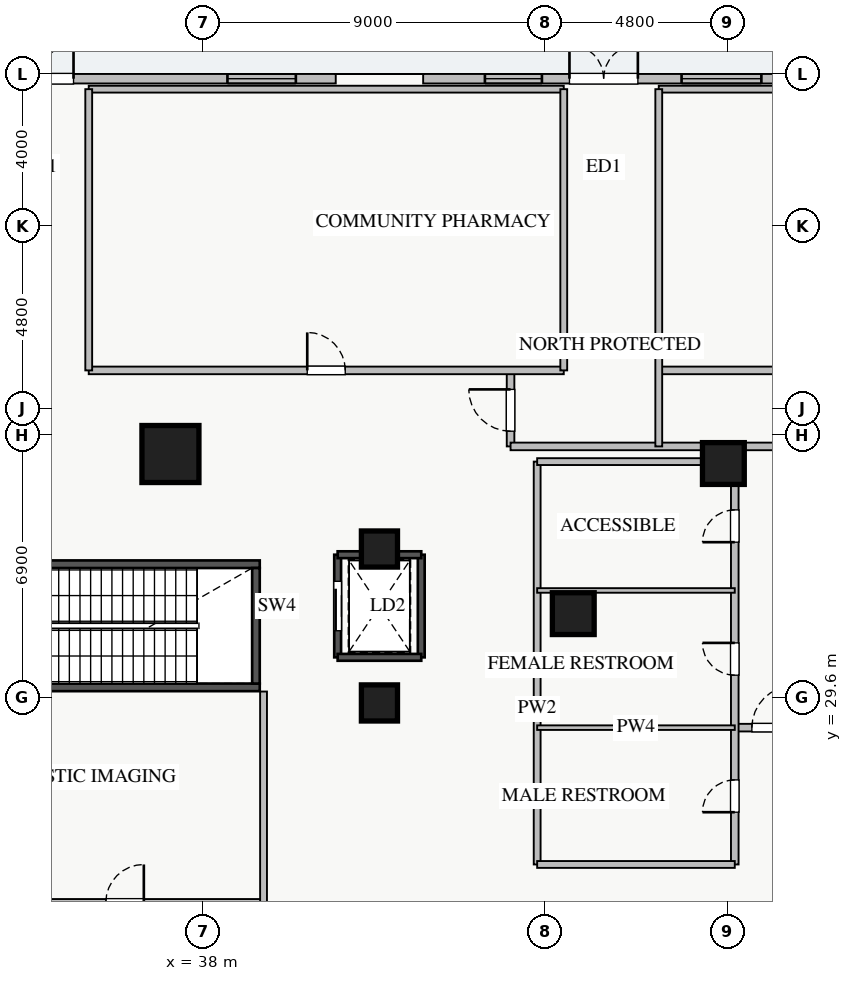
"""IFC4 building model, lengths in metres.
Left out: names, types, materials, properties, quantities, classifications, styles, units other than length and angle.
Written with IfcOpenShell. Run it as: python <this file> out.ifc"""

import sys

from ifc_helpers import new_model, si_unit, direction, frame, frame_2d, origin, origin_2d, place, context, subcontext, project, spatial, rectangle, extrude, source, transform, mapped, element, fill, save


model = new_model("IFC4")
c1 = context("Model", 3, precision=1e-05, world=origin(), true_north=direction((0.0, 1.0)))
c2 = subcontext(c1, "Body", "Model", "MODEL_VIEW")
j1 = project(units=[si_unit("LENGTHUNIT", "METRE"), si_unit("PLANEANGLEUNIT", "RADIAN")], contexts=[c1])
p1 = place(None, origin())
s1 = spatial("IfcSite", under=j1, at=p1, CompositionType="ELEMENT")
p2 = place(p1, origin())
s2 = spatial("IfcBuilding", under=s1, at=p2, CompositionType="ELEMENT")
p3 = place(p2, origin())
s3 = spatial("IfcBuildingStorey", under=s2, at=p3, CompositionType="ELEMENT", Elevation=0.0)
p4 = place(p3, frame((41.55, 30.65, 0.0), z_axis=(0.0, 0.0, 1.0), x_axis=(0.0, 1.0, 0.0)))
e1 = element("IfcWall", 1, at=p4, inside=s3, PredefinedType="SHEAR", context=c2, shape_type="SweptSolid", body=[
    extrude(rectangle(XDim=2.7, YDim=0.18, at=frame_2d((1.35, 0.0))), origin(), (0.0, 0.0, 1.0), 4.78),
])
p5 = place(p4, frame((0.7, 0.0, 0.0)))
e2 = element("IfcOpeningElement", 2, at=p5, cuts=e1, PredefinedType="OPENING", context=c2, shape_type="SweptSolid", body=[
    extrude(rectangle(XDim=1.3, YDim=2.05, at=frame_2d((0.65, 1.025))), frame((0.0, 0.1, 0.0), z_axis=(0.0, -1.0, 0.0), x_axis=(1.0, 0.0, 0.0)), (0.0, 0.0, 1.0), 0.2),
])
p6 = place(p3, frame((43.75, 30.65, 0.0), z_axis=(0.0, 0.0, 1.0), x_axis=(0.0, 1.0, 0.0)))
e3 = element("IfcWall", 3, at=p6, inside=s3, PredefinedType="SHEAR", context=c2, shape_type="SweptSolid", body=[
    extrude(rectangle(XDim=2.7, YDim=0.18, at=frame_2d((1.35, 0.0))), origin(), (0.0, 0.0, 1.0), 4.78),
])
for number, where, z_axis, x_axis in (
    (4, (41.55, 30.65, 0.0), (0.0, 0.0, 1.0), (1.0, 0.0, 0.0)),
    (5, (41.55, 33.35, 0.0), (0.0, 0.0, 1.0), (1.0, 0.0, 0.0)),
):
    element("IfcWall", number, at=place(p3, frame(where, z_axis=z_axis, x_axis=x_axis)), inside=s3, PredefinedType="SHEAR", context=c2, shape_type="SweptSolid", body=[
        extrude(rectangle(XDim=2.2, YDim=0.18, at=frame_2d((1.1, 0.0))), origin(), (0.0, 0.0, 1.0), 4.78),
    ])
for number, where, z_axis, x_axis in (
    (6, (32.25, 29.86, 0.0), (0.0, 0.0, 1.0), (1.0, 0.0, 0.0)),
    (7, (32.25, 33.1, 0.0), (0.0, 0.0, 1.0), (1.0, 0.0, 0.0)),
):
    element("IfcWall", number, at=place(p3, frame(where, z_axis=z_axis, x_axis=x_axis)), inside=s3, PredefinedType="SHEAR", context=c2, shape_type="SweptSolid", body=[
        extrude(rectangle(XDim=7.25, YDim=0.2, at=frame_2d((3.625, 0.0))), origin(), (0.0, 0.0, 1.0), 5.0),
    ])
p7 = place(p3, frame((39.4, 29.96, 0.0), z_axis=(0.0, 0.0, 1.0), x_axis=(0.0, 1.0, 0.0)))
e8 = element("IfcWall", 8, at=p7, inside=s3, PredefinedType="SHEAR", context=c2, shape_type="SweptSolid", body=[
    extrude(rectangle(XDim=3.04, YDim=0.2, at=frame_2d((1.52, 0.0))), origin(), (0.0, 0.0, 1.0), 5.0),
])
m1 = source(origin(), c2, "Body", "SweptSolid", [
    extrude(rectangle(XDim=1.5, YDim=1.5, at=origin_2d()), origin(), (0.0, 0.0, 1.0), 5.0),
])
p8 = place(p3, frame((37.15, 36.0, 0.0), z_axis=(0.0, 0.0, 1.0), x_axis=(1.0, 0.0, 0.0)))
e9 = element("IfcColumn", 9, at=p8, inside=s3, PredefinedType="COLUMN", context=c2, shape_type="MappedRepresentation", body=[
    mapped(m1, transform((0.0, 0.0, 0.0), x_axis=(1.0, 0.0, 0.0), y_axis=(0.0, 1.0, 0.0), z_axis=(0.0, 0.0, 1.0), scale=1.0)),
])
m2 = source(origin(), c2, "Body", "SweptSolid", [
    extrude(rectangle(XDim=1.1, YDim=1.1, at=origin_2d()), origin(), (0.0, 0.0, 1.0), 5.0),
])
for number, where, z_axis, x_axis in (
    (10, (51.7, 35.75, 0.0), (0.0, 0.0, 1.0), (1.0, 0.0, 0.0)),
    (11, (47.75, 31.8, 0.0), (0.0, 0.0, 1.0), (1.0, 0.0, 0.0)),
):
    element("IfcColumn", number, at=place(p3, frame(where, z_axis=z_axis, x_axis=x_axis)), inside=s3, PredefinedType="COLUMN", context=c2, shape_type="MappedRepresentation", body=[
        mapped(m2, transform((0.0, 0.0, 0.0), x_axis=(1.0, 0.0, 0.0), y_axis=(0.0, 1.0, 0.0), z_axis=(0.0, 0.0, 1.0), scale=1.0)),
    ])
m3 = source(origin(), c2, "Body", "SweptSolid", [
    extrude(rectangle(XDim=0.95, YDim=0.95, at=origin_2d()), origin(), (0.0, 0.0, 1.0), 5.0),
])
for number, where, z_axis, x_axis in (
    (12, (42.65, 29.45, 0.0), (0.0, 0.0, 1.0), (1.0, 0.0, 0.0)),
    (13, (42.65, 33.5, 0.0), (0.0, 0.0, 1.0), (1.0, 0.0, 0.0)),
):
    element("IfcColumn", number, at=place(p3, frame(where, z_axis=z_axis, x_axis=x_axis)), inside=s3, PredefinedType="COLUMN", context=c2, shape_type="MappedRepresentation", body=[
        mapped(m3, transform((0.0, 0.0, 0.0), x_axis=(1.0, 0.0, 0.0), y_axis=(0.0, 1.0, 0.0), z_axis=(0.0, 0.0, 1.0), scale=1.0)),
    ])
p9 = place(p3, frame((25.9, 45.875, 0.0), z_axis=(0.0, 0.0, 1.0), x_axis=(1.0, 0.0, 0.0)))
e14 = element("IfcWall", 14, at=p9, inside=s3, PredefinedType="STANDARD", context=c2, shape_type="SweptSolid", body=[
    extrude(rectangle(XDim=15.6, YDim=0.25, at=frame_2d((7.8, 0.0))), origin(), (0.0, 0.0, 1.0), 4.32),
])
p10 = place(p9, frame((6.9, 0.0, 0.0)))
e15 = element("IfcOpeningElement", 15, at=p10, cuts=e14, PredefinedType="OPENING", context=c2, shape_type="SweptSolid", body=[
    extrude(rectangle(XDim=1.8, YDim=2.2, at=frame_2d((0.9, 1.1))), frame((0.0, 0.135, 0.0), z_axis=(0.0, -1.0, 0.0), x_axis=(1.0, 0.0, 0.0)), (0.0, 0.0, 1.0), 0.27),
])
p11 = place(p9, frame((1.2, 0.0, 0.9)))
e16 = element("IfcOpeningElement", 16, at=p11, cuts=e14, PredefinedType="OPENING", context=c2, shape_type="SweptSolid", body=[
    extrude(rectangle(XDim=1.5, YDim=1.45, at=frame_2d((0.75, 0.725))), frame((0.0, 0.135, 0.0), z_axis=(0.0, -1.0, 0.0), x_axis=(1.0, 0.0, 0.0)), (0.0, 0.0, 1.0), 0.27),
])
p12 = place(p9, frame((12.75, 0.0, 0.9)))
e17 = element("IfcOpeningElement", 17, at=p12, cuts=e14, PredefinedType="OPENING", context=c2, shape_type="SweptSolid", body=[
    extrude(rectangle(XDim=1.8, YDim=1.45, at=frame_2d((0.9, 0.725))), frame((0.0, 0.135, 0.0), z_axis=(0.0, -1.0, 0.0), x_axis=(1.0, 0.0, 0.0)), (0.0, 0.0, 1.0), 0.27),
])
p13 = place(p3, frame((43.8, 45.875, 0.0), z_axis=(0.0, 0.0, 1.0), x_axis=(1.0, 0.0, 0.0)))
e18 = element("IfcWall", 18, at=p13, inside=s3, PredefinedType="STANDARD", context=c2, shape_type="SweptSolid", body=[
    extrude(rectangle(XDim=9.5, YDim=0.25, at=frame_2d((4.75, 0.0))), origin(), (0.0, 0.0, 1.0), 4.32),
])
p14 = place(p13, frame((3.85, 0.0, 0.0)))
e19 = element("IfcOpeningElement", 19, at=p14, cuts=e18, PredefinedType="OPENING", context=c2, shape_type="SweptSolid", body=[
    extrude(rectangle(XDim=1.8, YDim=2.2, at=frame_2d((0.9, 1.1))), frame((0.0, 0.135, 0.0), z_axis=(0.0, -1.0, 0.0), x_axis=(1.0, 0.0, 0.0)), (0.0, 0.0, 1.0), 0.27),
])
p15 = place(p13, frame((1.625, 0.0, 0.9)))
e20 = element("IfcOpeningElement", 20, at=p15, cuts=e18, PredefinedType="OPENING", context=c2, shape_type="SweptSolid", body=[
    extrude(rectangle(XDim=1.5, YDim=1.45, at=frame_2d((0.75, 0.725))), frame((0.0, 0.135, 0.0), z_axis=(0.0, -1.0, 0.0), x_axis=(1.0, 0.0, 0.0)), (0.0, 0.0, 1.0), 0.27),
])
p16 = place(p13, frame((6.8, 0.0, 0.9)))
e21 = element("IfcOpeningElement", 21, at=p16, cuts=e18, PredefinedType="OPENING", context=c2, shape_type="SweptSolid", body=[
    extrude(rectangle(XDim=2.1, YDim=1.5, at=frame_2d((1.05, 0.75))), frame((0.0, 0.135, 0.0), z_axis=(0.0, -1.0, 0.0), x_axis=(1.0, 0.0, 0.0)), (0.0, 0.0, 1.0), 0.27),
])
p17 = place(p3, frame((52.0, 28.8, 0.0), z_axis=(0.0, 0.0, 1.0), x_axis=(1.0, 0.0, 0.0)))
e22 = element("IfcWall", 22, at=p17, inside=s3, PredefinedType="PARTITIONING", context=c2, shape_type="SweptSolid", body=[
    extrude(rectangle(XDim=2.2, YDim=0.2, at=frame_2d((1.1, 0.0))), origin(), (0.0, 0.0, 1.0), 4.78),
])
p18 = place(p17, frame((0.45, 0.0, 0.0)))
e23 = element("IfcOpeningElement", 23, at=p18, cuts=e22, PredefinedType="OPENING", context=c2, shape_type="SweptSolid", body=[
    extrude(rectangle(XDim=1.1, YDim=2.05, at=frame_2d((0.55, 1.025))), frame((0.0, 0.11, 0.0), z_axis=(0.0, -1.0, 0.0), x_axis=(1.0, 0.0, 0.0)), (0.0, 0.0, 1.0), 0.22),
])
p19 = place(p3, frame((52.0, 25.2, 0.0), z_axis=(0.0, 0.0, 1.0), x_axis=(0.0, 1.0, 0.0)))
e24 = element("IfcWall", 24, at=p19, inside=s3, PredefinedType="PARTITIONING", context=c2, shape_type="SweptSolid", body=[
    extrude(rectangle(XDim=11.0, YDim=0.2, at=frame_2d((5.5, 0.0))), origin(), (0.0, 0.0, 1.0), 4.78),
])
p20 = place(p19, frame((1.375, 0.0, 0.0)))
e25 = element("IfcOpeningElement", 25, at=p20, cuts=e24, PredefinedType="OPENING", context=c2, shape_type="SweptSolid", body=[
    extrude(rectangle(XDim=0.85, YDim=2.05, at=frame_2d((0.425, 1.025))), frame((0.0, 0.11, 0.0), z_axis=(0.0, -1.0, 0.0), x_axis=(1.0, 0.0, 0.0)), (0.0, 0.0, 1.0), 0.22),
])
p21 = place(p19, frame((4.98, 0.0, 0.0)))
e26 = element("IfcOpeningElement", 26, at=p21, cuts=e24, PredefinedType="OPENING", context=c2, shape_type="SweptSolid", body=[
    extrude(rectangle(XDim=0.85, YDim=2.05, at=frame_2d((0.425, 1.025))), frame((0.0, 0.11, 0.0), z_axis=(0.0, -1.0, 0.0), x_axis=(1.0, 0.0, 0.0)), (0.0, 0.0, 1.0), 0.22),
])
p22 = place(p19, frame((8.48, 0.0, 0.0)))
e27 = element("IfcOpeningElement", 27, at=p22, cuts=e24, PredefinedType="OPENING", context=c2, shape_type="SweptSolid", body=[
    extrude(rectangle(XDim=0.85, YDim=2.05, at=frame_2d((0.425, 1.025))), frame((0.0, 0.11, 0.0), z_axis=(0.0, -1.0, 0.0), x_axis=(1.0, 0.0, 0.0)), (0.0, 0.0, 1.0), 0.22),
])
p23 = place(p3, frame((46.1, 36.2, 0.0), z_axis=(0.0, 0.0, 1.0), x_axis=(0.0, 1.0, 0.0)))
e28 = element("IfcWall", 28, at=p23, inside=s3, PredefinedType="PARTITIONING", context=c2, shape_type="SweptSolid", body=[
    extrude(rectangle(XDim=2.0, YDim=0.2, at=frame_2d((1.0, 0.0))), origin(), (0.0, 0.0, 1.0), 4.78),
])
p24 = place(p23, frame((0.4, 0.0, 0.0)))
e29 = element("IfcOpeningElement", 29, at=p24, cuts=e28, PredefinedType="OPENING", context=c2, shape_type="SweptSolid", body=[
    extrude(rectangle(XDim=1.1, YDim=2.05, at=frame_2d((0.55, 1.025))), frame((0.0, 0.11, 0.0), z_axis=(0.0, -1.0, 0.0), x_axis=(1.0, 0.0, 0.0)), (0.0, 0.0, 1.0), 0.22),
])
p25 = place(p3, frame((46.1, 36.2, 0.0), z_axis=(0.0, 0.0, 1.0), x_axis=(1.0, 0.0, 0.0)))
e30 = element("IfcWall", 30, at=p25, inside=s3, PredefinedType="PARTITIONING", context=c2, shape_type="SweptSolid", body=[
    extrude(rectangle(XDim=14.4, YDim=0.2, at=frame_2d((7.2, 0.0))), origin(), (0.0, 0.0, 1.0), 4.78),
])
p26 = place(p25, frame((8.65, 0.0, 0.0)))
e31 = element("IfcOpeningElement", 31, at=p26, cuts=e30, PredefinedType="OPENING", context=c2, shape_type="SweptSolid", body=[
    extrude(rectangle(XDim=1.0, YDim=2.05, at=frame_2d((0.5, 1.025))), frame((0.0, 0.11, 0.0), z_axis=(0.0, -1.0, 0.0), x_axis=(1.0, 0.0, 0.0)), (0.0, 0.0, 1.0), 0.22),
])
p27 = place(p3, frame((50.0, 38.2, 0.0), z_axis=(0.0, 0.0, 1.0), x_axis=(1.0, 0.0, 0.0)))
e32 = element("IfcWall", 32, at=p27, inside=s3, PredefinedType="PARTITIONING", context=c2, shape_type="SweptSolid", body=[
    extrude(rectangle(XDim=4.2, YDim=0.2, at=frame_2d((2.1, 0.0))), origin(), (0.0, 0.0, 1.0), 4.78),
])
p28 = place(p3, frame((35.0, 38.2, 0.0), z_axis=(0.0, 0.0, 1.0), x_axis=(1.0, 0.0, 0.0)))
e33 = element("IfcWall", 33, at=p28, inside=s3, PredefinedType="PARTITIONING", context=c2, shape_type="SweptSolid", body=[
    extrude(rectangle(XDim=12.5, YDim=0.2, at=frame_2d((6.25, 0.0))), origin(), (0.0, 0.0, 1.0), 4.78),
])
p29 = place(p28, frame((5.75, 0.0, 0.0)))
e34 = element("IfcOpeningElement", 34, at=p29, cuts=e33, PredefinedType="OPENING", context=c2, shape_type="SweptSolid", body=[
    extrude(rectangle(XDim=1.0, YDim=2.05, at=frame_2d((0.5, 1.025))), frame((0.0, 0.11, 0.0), z_axis=(0.0, -1.0, 0.0), x_axis=(1.0, 0.0, 0.0)), (0.0, 0.0, 1.0), 0.22),
])
p30 = place(p3, frame((46.8, 25.2, 0.0), z_axis=(0.0, 0.0, 1.0), x_axis=(0.0, 1.0, 0.0)))
e35 = element("IfcWall", 35, at=p30, inside=s3, PredefinedType="PARTITIONING", context=c2, shape_type="SweptSolid", body=[
    extrude(rectangle(XDim=10.6, YDim=0.18, at=frame_2d((5.3, 0.0))), origin(), (0.0, 0.0, 1.0), 4.78),
])
for number, where, z_axis, x_axis in (
    (36, (46.8, 25.2, 0.0), (0.0, 0.0, 1.0), (1.0, 0.0, 0.0)),
    (37, (46.8, 35.8, 0.0), (0.0, 0.0, 1.0), (1.0, 0.0, 0.0)),
):
    element("IfcWall", number, at=place(p3, frame(where, z_axis=z_axis, x_axis=x_axis)), inside=s3, PredefinedType="PARTITIONING", context=c2, shape_type="SweptSolid", body=[
        extrude(rectangle(XDim=5.2, YDim=0.18, at=frame_2d((2.6, 0.0))), origin(), (0.0, 0.0, 1.0), 4.78),
    ])
for number, where, z_axis, x_axis in (
    (38, (46.8, 28.8, 0.0), (0.0, 0.0, 1.0), (1.0, 0.0, 0.0)),
    (39, (46.8, 32.41, 0.0), (0.0, 0.0, 1.0), (1.0, 0.0, 0.0)),
):
    element("IfcWall", number, at=place(p3, frame(where, z_axis=z_axis, x_axis=x_axis)), inside=s3, PredefinedType="PLUMBINGWALL", context=c2, shape_type="SweptSolid", body=[
        extrude(rectangle(XDim=5.2, YDim=0.12, at=frame_2d((2.6, 0.0))), origin(), (0.0, 0.0, 1.0), 4.78),
    ])
p31 = place(p3, frame((35.0, 45.6, 0.0), z_axis=(0.0, 0.0, 1.0), x_axis=(1.0, 0.0, 0.0)))
e40 = element("IfcWall", 40, at=p31, inside=s3, PredefinedType="PARTITIONING", context=c2, shape_type="SweptSolid", body=[
    extrude(rectangle(XDim=12.5, YDim=0.18, at=frame_2d((6.25, 0.0))), origin(), (0.0, 0.0, 1.0), 4.78),
])
for number, where, z_axis, x_axis in (
    (41, (35.0, 38.2, 0.0), (0.0, 0.0, 1.0), (0.0, 1.0, 0.0)),
    (42, (47.5, 38.2, 0.0), (0.0, 0.0, 1.0), (0.0, 1.0, 0.0)),
):
    element("IfcWall", number, at=place(p3, frame(where, z_axis=z_axis, x_axis=x_axis)), inside=s3, PredefinedType="PARTITIONING", context=c2, shape_type="SweptSolid", body=[
        extrude(rectangle(XDim=7.4, YDim=0.18, at=frame_2d((3.7, 0.0))), origin(), (0.0, 0.0, 1.0), 4.78),
    ])
p32 = place(p3, frame((32.3, 24.2, 0.0), z_axis=(0.0, 0.0, 1.0), x_axis=(1.0, 0.0, 0.0)))
e43 = element("IfcWall", 43, at=p32, inside=s3, PredefinedType="PARTITIONING", context=c2, shape_type="SweptSolid", body=[
    extrude(rectangle(XDim=7.3, YDim=0.18, at=frame_2d((3.65, 0.0))), origin(), (0.0, 0.0, 1.0), 4.78),
])
p33 = place(p32, frame((3.15, 0.0, 0.0)))
e44 = element("IfcOpeningElement", 44, at=p33, cuts=e43, PredefinedType="OPENING", context=c2, shape_type="SweptSolid", body=[
    extrude(rectangle(XDim=1.0, YDim=2.05, at=frame_2d((0.5, 1.025))), frame((0.0, 0.1, 0.0), z_axis=(0.0, -1.0, 0.0), x_axis=(1.0, 0.0, 0.0)), (0.0, 0.0, 1.0), 0.2),
])
p34 = place(p3, frame((39.6, 24.2, 0.0), z_axis=(0.0, 0.0, 1.0), x_axis=(0.0, 1.0, 0.0)))
e45 = element("IfcWall", 45, at=p34, inside=s3, PredefinedType="PARTITIONING", context=c2, shape_type="SweptSolid", body=[
    extrude(rectangle(XDim=5.55, YDim=0.18, at=frame_2d((2.775, 0.0))), origin(), (0.0, 0.0, 1.0), 4.78),
])
p35 = place(p3, frame((50.0, 45.6, 0.0), z_axis=(0.0, 0.0, 1.0), x_axis=(1.0, 0.0, 0.0)))
e46 = element("IfcWall", 46, at=p35, inside=s3, PredefinedType="PARTITIONING", context=c2, shape_type="SweptSolid", body=[
    extrude(rectangle(XDim=10.5, YDim=0.18, at=frame_2d((5.25, 0.0))), origin(), (0.0, 0.0, 1.0), 4.78),
])
p36 = place(p3, frame((50.0, 36.2, 0.0), z_axis=(0.0, 0.0, 1.0), x_axis=(0.0, 1.0, 0.0)))
e47 = element("IfcWall", 47, at=p36, inside=s3, PredefinedType="PARTITIONING", context=c2, shape_type="SweptSolid", body=[
    extrude(rectangle(XDim=9.4, YDim=0.18, at=frame_2d((4.7, 0.0))), origin(), (0.0, 0.0, 1.0), 4.78),
])
m4 = source(origin(), c2, "Body", "SweptSolid", [
    extrude(rectangle(XDim=1.8, YDim=2.2, at=frame_2d((0.9, 1.1))), frame((0.0, 0.025, 0.0), z_axis=(0.0, -1.0, 0.0), x_axis=(1.0, 0.0, 0.0)), (0.0, 0.0, 1.0), 0.05),
])
p37 = place(p10, origin())
e48 = element("IfcDoor", 48, at=p37, inside=s3, OperationType="DOUBLE_DOOR_SINGLE_SWING", PredefinedType="DOOR", context=c2, shape_type="MappedRepresentation", body=[
    mapped(m4, transform((0.0, 0.0, 0.0), x_axis=(1.0, 0.0, 0.0), y_axis=(0.0, 1.0, 0.0), z_axis=(0.0, 0.0, 1.0), scale=1.0)),
])
fill(e15, e48)
m5 = source(origin(), c2, "Body", "SweptSolid", [
    extrude(rectangle(XDim=1.8, YDim=1.45, at=frame_2d((0.9, 0.725))), frame((0.0, 0.03, 0.0), z_axis=(0.0, -1.0, 0.0), x_axis=(1.0, 0.0, 0.0)), (0.0, 0.0, 1.0), 0.06),
])
p38 = place(p12, origin())
e49 = element("IfcWindow", 49, at=p38, inside=s3, PartitioningType="DOUBLE_PANEL_VERTICAL", PredefinedType="WINDOW", context=c2, shape_type="MappedRepresentation", body=[
    mapped(m5, transform((0.0, 0.0, 0.0), x_axis=(1.0, 0.0, 0.0), y_axis=(0.0, 1.0, 0.0), z_axis=(0.0, 0.0, 1.0), scale=1.0)),
])
fill(e17, e49)
p39 = place(p14, origin())
e50 = element("IfcDoor", 50, at=p39, inside=s3, OperationType="DOUBLE_DOOR_SINGLE_SWING", PredefinedType="DOOR", context=c2, shape_type="MappedRepresentation", body=[
    mapped(m4, transform((0.0, 0.0, 0.0), x_axis=(1.0, 0.0, 0.0), y_axis=(0.0, 1.0, 0.0), z_axis=(0.0, 0.0, 1.0), scale=1.0)),
])
fill(e19, e50)
m6 = source(origin(), c2, "Body", "SweptSolid", [
    extrude(rectangle(XDim=1.5, YDim=1.45, at=frame_2d((0.75, 0.725))), frame((0.0, 0.03, 0.0), z_axis=(0.0, -1.0, 0.0), x_axis=(1.0, 0.0, 0.0)), (0.0, 0.0, 1.0), 0.06),
])
p40 = place(p15, origin())
e51 = element("IfcWindow", 51, at=p40, inside=s3, PartitioningType="DOUBLE_PANEL_VERTICAL", PredefinedType="WINDOW", context=c2, shape_type="MappedRepresentation", body=[
    mapped(m6, transform((0.0, 0.0, 0.0), x_axis=(1.0, 0.0, 0.0), y_axis=(0.0, 1.0, 0.0), z_axis=(0.0, 0.0, 1.0), scale=1.0)),
])
fill(e20, e51)
m7 = source(origin(), c2, "Body", "SweptSolid", [
    extrude(rectangle(XDim=2.1, YDim=1.5, at=frame_2d((1.05, 0.75))), frame((0.0, 0.03, 0.0), z_axis=(0.0, -1.0, 0.0), x_axis=(1.0, 0.0, 0.0)), (0.0, 0.0, 1.0), 0.06),
])
p41 = place(p16, origin())
e52 = element("IfcWindow", 52, at=p41, inside=s3, PartitioningType="TRIPLE_PANEL_VERTICAL", PredefinedType="WINDOW", context=c2, shape_type="MappedRepresentation", body=[
    mapped(m7, transform((0.0, 0.0, 0.0), x_axis=(1.0, 0.0, 0.0), y_axis=(0.0, 1.0, 0.0), z_axis=(0.0, 0.0, 1.0), scale=1.0)),
])
fill(e21, e52)
m8 = source(origin(), c2, "Body", "SweptSolid", [
    extrude(rectangle(XDim=1.3, YDim=2.05, at=frame_2d((0.65, 1.025))), frame((0.0, 0.025, 0.0), z_axis=(0.0, -1.0, 0.0), x_axis=(1.0, 0.0, 0.0)), (0.0, 0.0, 1.0), 0.05),
])
p42 = place(p5, origin())
e53 = element("IfcDoor", 53, at=p42, inside=s3, OperationType="SLIDING_TO_LEFT", PredefinedType="DOOR", context=c2, shape_type="MappedRepresentation", body=[
    mapped(m8, transform((0.0, 0.0, 0.0), x_axis=(1.0, 0.0, 0.0), y_axis=(0.0, 1.0, 0.0), z_axis=(0.0, 0.0, 1.0), scale=1.0)),
])
fill(e2, e53)
m9 = source(origin(), c2, "Body", "SweptSolid", [
    extrude(rectangle(XDim=1.1, YDim=2.05, at=frame_2d((0.55, 1.025))), frame((0.0, 0.025, 0.0), z_axis=(0.0, -1.0, 0.0), x_axis=(1.0, 0.0, 0.0)), (0.0, 0.0, 1.0), 0.05),
])
p43 = place(p18, origin())
e54 = element("IfcDoor", 54, at=p43, inside=s3, OperationType="SINGLE_SWING_RIGHT", PredefinedType="DOOR", context=c2, shape_type="MappedRepresentation", body=[
    mapped(m9, transform((0.0, 0.0, 0.0), x_axis=(1.0, 0.0, 0.0), y_axis=(0.0, 1.0, 0.0), z_axis=(0.0, 0.0, 1.0), scale=1.0)),
])
fill(e23, e54)
m10 = source(origin(), c2, "Body", "SweptSolid", [
    extrude(rectangle(XDim=0.85, YDim=2.05, at=frame_2d((0.425, 1.025))), frame((0.0, 0.025, 0.0), z_axis=(0.0, -1.0, 0.0), x_axis=(1.0, 0.0, 0.0)), (0.0, 0.0, 1.0), 0.05),
])
p44 = place(p20, origin())
e55 = element("IfcDoor", 55, at=p44, inside=s3, OperationType="SINGLE_SWING_LEFT", PredefinedType="DOOR", context=c2, shape_type="MappedRepresentation", body=[
    mapped(m10, transform((0.0, 0.0, 0.0), x_axis=(1.0, 0.0, 0.0), y_axis=(0.0, 1.0, 0.0), z_axis=(0.0, 0.0, 1.0), scale=1.0)),
])
fill(e25, e55)
p45 = place(p21, origin())
e56 = element("IfcDoor", 56, at=p45, inside=s3, OperationType="SINGLE_SWING_RIGHT", PredefinedType="DOOR", context=c2, shape_type="MappedRepresentation", body=[
    mapped(m10, transform((0.0, 0.0, 0.0), x_axis=(1.0, 0.0, 0.0), y_axis=(0.0, 1.0, 0.0), z_axis=(0.0, 0.0, 1.0), scale=1.0)),
])
fill(e26, e56)
p46 = place(p22, origin())
e57 = element("IfcDoor", 57, at=p46, inside=s3, OperationType="SINGLE_SWING_LEFT", PredefinedType="DOOR", context=c2, shape_type="MappedRepresentation", body=[
    mapped(m10, transform((0.0, 0.0, 0.0), x_axis=(1.0, 0.0, 0.0), y_axis=(0.0, 1.0, 0.0), z_axis=(0.0, 0.0, 1.0), scale=1.0)),
])
fill(e27, e57)
p47 = place(p24, origin())
e58 = element("IfcDoor", 58, at=p47, inside=s3, OperationType="SINGLE_SWING_RIGHT", PredefinedType="DOOR", context=c2, shape_type="MappedRepresentation", body=[
    mapped(m9, transform((0.0, 0.0, 0.0), x_axis=(1.0, 0.0, 0.0), y_axis=(0.0, 1.0, 0.0), z_axis=(0.0, 0.0, 1.0), scale=1.0)),
])
fill(e29, e58)
m11 = source(origin(), c2, "Body", "SweptSolid", [
    extrude(rectangle(XDim=1.0, YDim=2.05, at=frame_2d((0.5, 1.025))), frame((0.0, 0.025, 0.0), z_axis=(0.0, -1.0, 0.0), x_axis=(1.0, 0.0, 0.0)), (0.0, 0.0, 1.0), 0.05),
])
p48 = place(p29, origin())
e59 = element("IfcDoor", 59, at=p48, inside=s3, OperationType="SINGLE_SWING_LEFT", PredefinedType="DOOR", context=c2, shape_type="MappedRepresentation", body=[
    mapped(m11, transform((0.0, 0.0, 0.0), x_axis=(1.0, 0.0, 0.0), y_axis=(0.0, 1.0, 0.0), z_axis=(0.0, 0.0, 1.0), scale=1.0)),
])
fill(e34, e59)
save(model, sys.argv[1])
